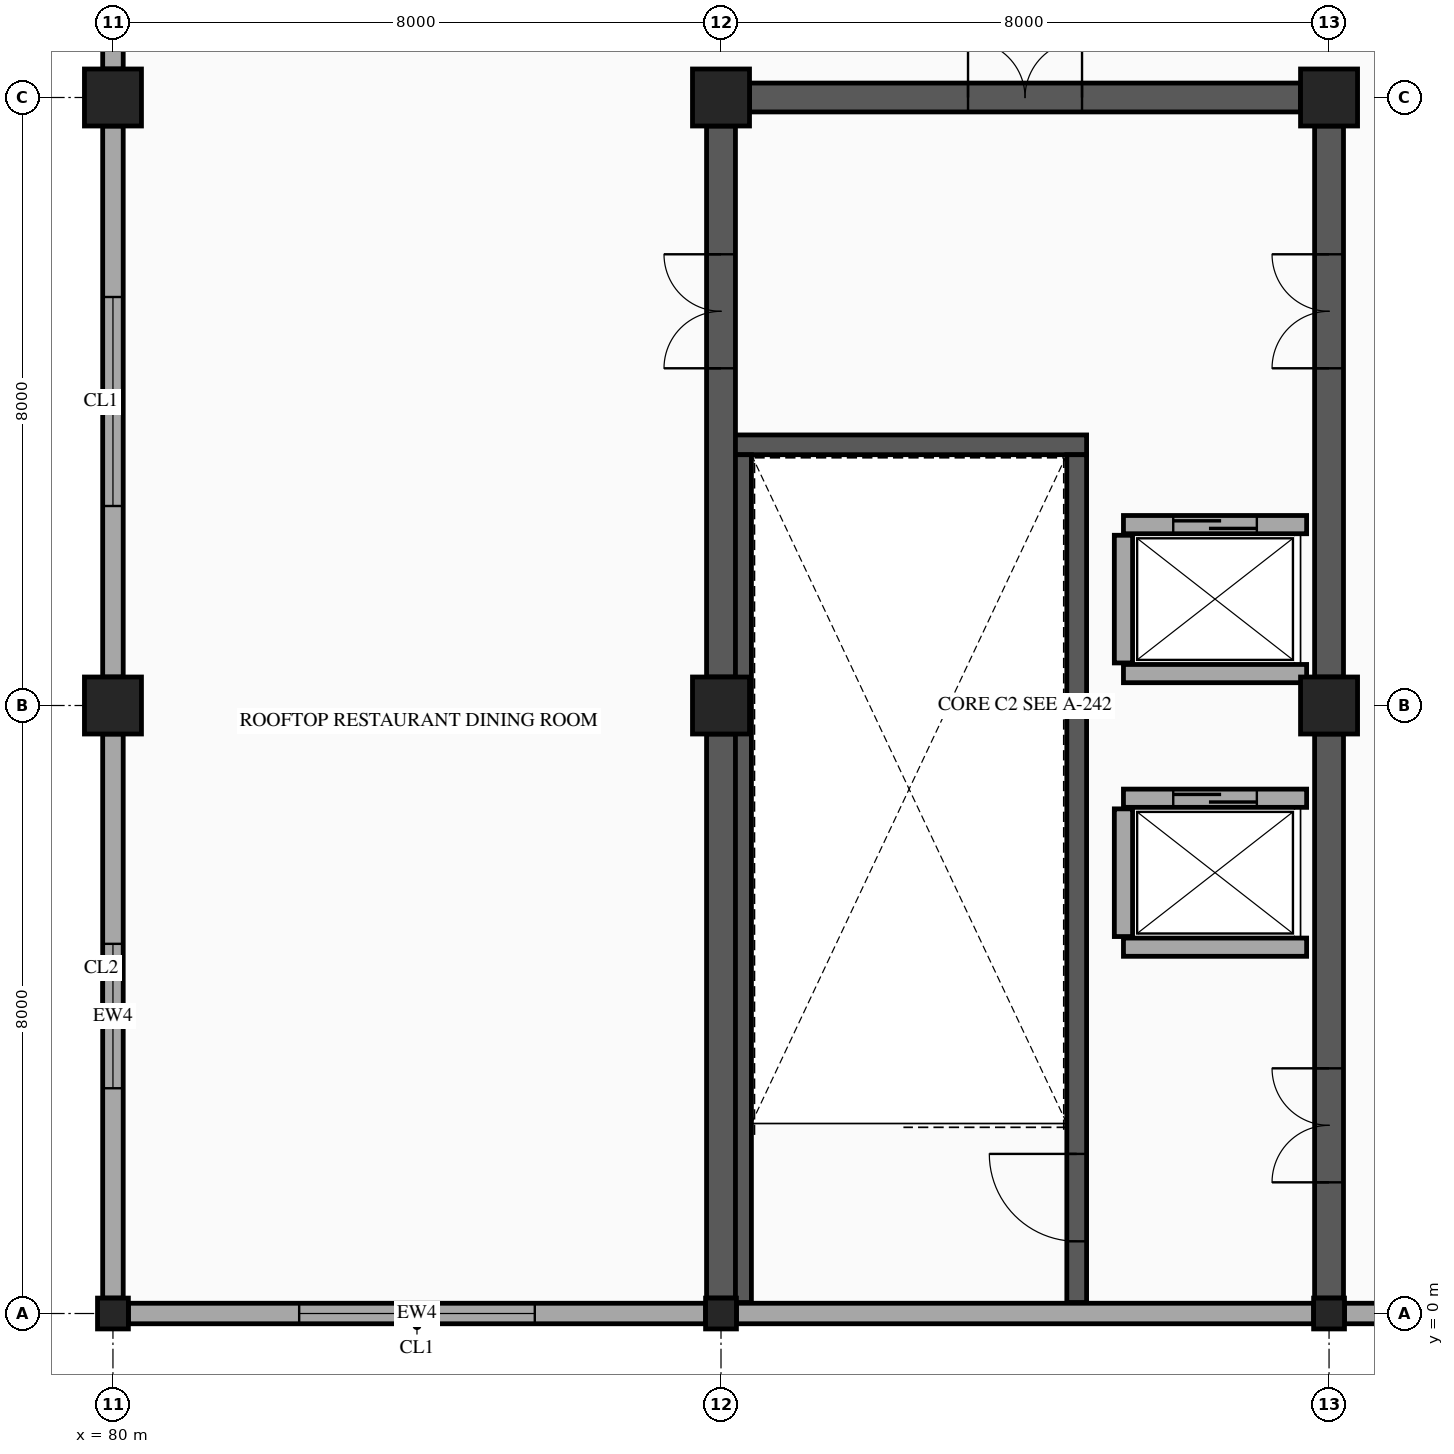
"""IFC4 building model, lengths in metres.
Left out: names, types, materials, properties, quantities, classifications, styles, units other than length and angle.
Written with IfcOpenShell. Run it as: python <this file> out.ifc"""

import sys

from ifc_helpers import new_model, si_unit, direction, frame, frame_2d, origin, origin_2d, place, context, subcontext, project, spatial, rectangle, hollow_rectangle, extrude, element, fill, save


model = new_model("IFC4")
c1 = context("Model", 3, precision=1e-05, world=origin(), true_north=direction((0.0, 1.0)))
c2 = subcontext(c1, "Body", "Model", "MODEL_VIEW")
j1 = project(units=[si_unit("LENGTHUNIT", "METRE"), si_unit("PLANEANGLEUNIT", "RADIAN")], contexts=[c1])
p1 = place(None, origin())
s1 = spatial("IfcSite", under=j1, at=p1, CompositionType="ELEMENT")
p2 = place(p1, origin())
s2 = spatial("IfcBuilding", under=s1, at=p2, CompositionType="ELEMENT")
p3 = place(p2, frame((0.0, 0.0, 28.4)))
s3 = spatial("IfcBuildingStorey", under=s2, at=p3, CompositionType="ELEMENT", Elevation=28.4)
p4 = place(p3, frame((80.0, 0.0, 0.0), z_axis=(0.0, 0.0, 1.0), x_axis=(1.0, 0.0, 0.0)))
e1 = element("IfcColumn", 1, at=p4, inside=s3, PredefinedType="COLUMN", context=c2, shape_type="SweptSolid", body=[
    extrude(hollow_rectangle(XDim=0.406, YDim=0.406, WallThickness=0.015, InnerFilletRadius=0.015, OuterFilletRadius=0.029, at=origin_2d()), origin(), (0.0, 0.0, 1.0), 4.5),
])
for number, where, z_axis, x_axis in (
    (2, (80.0, 8.0, 0.0), (0.0, 0.0, 1.0), (1.0, 0.0, 0.0)),
    (3, (80.0, 16.0, 0.0), (0.0, 0.0, 1.0), (1.0, 0.0, 0.0)),
):
    element("IfcColumn", number, at=place(p3, frame(where, z_axis=z_axis, x_axis=x_axis)), inside=s3, PredefinedType="COLUMN", context=c2, shape_type="SweptSolid", body=[
        extrude(rectangle(XDim=0.75, YDim=0.75, at=origin_2d()), origin(), (0.0, 0.0, 1.0), 4.5),
    ])
p5 = place(p3, frame((88.0, 0.0, 0.0), z_axis=(0.0, 0.0, 1.0), x_axis=(1.0, 0.0, 0.0)))
e4 = element("IfcColumn", 4, at=p5, inside=s3, PredefinedType="COLUMN", context=c2, shape_type="SweptSolid", body=[
    extrude(hollow_rectangle(XDim=0.406, YDim=0.406, WallThickness=0.015, InnerFilletRadius=0.015, OuterFilletRadius=0.029, at=origin_2d()), origin(), (0.0, 0.0, 1.0), 4.5),
])
for number, where, z_axis, x_axis in (
    (5, (88.0, 8.0, 0.0), (0.0, 0.0, 1.0), (1.0, 0.0, 0.0)),
    (6, (88.0, 16.0, 0.0), (0.0, 0.0, 1.0), (1.0, 0.0, 0.0)),
):
    element("IfcColumn", number, at=place(p3, frame(where, z_axis=z_axis, x_axis=x_axis)), inside=s3, PredefinedType="COLUMN", context=c2, shape_type="SweptSolid", body=[
        extrude(rectangle(XDim=0.75, YDim=0.75, at=origin_2d()), origin(), (0.0, 0.0, 1.0), 4.5),
    ])
p6 = place(p3, frame((96.0, 0.0, 0.0), z_axis=(0.0, 0.0, 1.0), x_axis=(1.0, 0.0, 0.0)))
e7 = element("IfcColumn", 7, at=p6, inside=s3, PredefinedType="COLUMN", context=c2, shape_type="SweptSolid", body=[
    extrude(hollow_rectangle(XDim=0.406, YDim=0.406, WallThickness=0.015, InnerFilletRadius=0.015, OuterFilletRadius=0.029, at=origin_2d()), origin(), (0.0, 0.0, 1.0), 4.5),
])
for number, where, z_axis, x_axis in (
    (8, (96.0, 8.0, 0.0), (0.0, 0.0, 1.0), (1.0, 0.0, 0.0)),
    (9, (96.0, 16.0, 0.0), (0.0, 0.0, 1.0), (1.0, 0.0, 0.0)),
):
    element("IfcColumn", number, at=place(p3, frame(where, z_axis=z_axis, x_axis=x_axis)), inside=s3, PredefinedType="COLUMN", context=c2, shape_type="SweptSolid", body=[
        extrude(rectangle(XDim=0.75, YDim=0.75, at=origin_2d()), origin(), (0.0, 0.0, 1.0), 4.5),
    ])
p7 = place(p3, frame((103.797, 0.0, 0.0), z_axis=(0.0, 0.0, 1.0), x_axis=(-1.0, 0.0, 0.0)))
e10 = element("IfcWall", 10, at=p7, inside=s3, PredefinedType="STANDARD", context=c2, shape_type="SweptSolid", body=[
    extrude(rectangle(XDim=7.594, YDim=0.27, at=frame_2d((3.797, 0.0))), origin(), (0.0, 0.0, 1.0), 3.48),
])
p8 = place(p7, frame((2.297, 0.0, 0.8)))
e11 = element("IfcOpeningElement", 11, at=p8, cuts=e10, PredefinedType="OPENING", context=c2, shape_type="SweptSolid", body=[
    extrude(rectangle(XDim=3.0, YDim=1.6, at=frame_2d((1.5, 0.8))), frame((0.0, 0.145, 0.0), z_axis=(0.0, -1.0, 0.0), x_axis=(1.0, 0.0, 0.0)), (0.0, 0.0, 1.0), 0.29),
])
p9 = place(p3, frame((95.797, 0.0, 0.0), z_axis=(0.0, 0.0, 1.0), x_axis=(-1.0, 0.0, 0.0)))
e12 = element("IfcWall", 12, at=p9, inside=s3, PredefinedType="STANDARD", context=c2, shape_type="SweptSolid", body=[
    extrude(rectangle(XDim=7.594, YDim=0.27, at=frame_2d((3.797, 0.0))), origin(), (0.0, 0.0, 1.0), 3.48),
])
p10 = place(p3, frame((87.797, 0.0, 0.0), z_axis=(0.0, 0.0, 1.0), x_axis=(-1.0, 0.0, 0.0)))
e13 = element("IfcWall", 13, at=p10, inside=s3, PredefinedType="STANDARD", context=c2, shape_type="SweptSolid", body=[
    extrude(rectangle(XDim=7.594, YDim=0.27, at=frame_2d((3.797, 0.0))), origin(), (0.0, 0.0, 1.0), 3.48),
])
p11 = place(p10, frame((2.247, 0.0, 0.8)))
e14 = element("IfcOpeningElement", 14, at=p11, cuts=e13, PredefinedType="OPENING", context=c2, shape_type="SweptSolid", body=[
    extrude(rectangle(XDim=3.1, YDim=1.35, at=frame_2d((1.55, 0.675))), frame((0.0, 0.145, 0.0), z_axis=(0.0, -1.0, 0.0), x_axis=(1.0, 0.0, 0.0)), (0.0, 0.0, 1.0), 0.29),
])
p12 = place(p3, frame((80.0, 0.203, 0.0), z_axis=(0.0, 0.0, 1.0), x_axis=(0.0, 1.0, 0.0)))
e15 = element("IfcWall", 15, at=p12, inside=s3, PredefinedType="STANDARD", context=c2, shape_type="SweptSolid", body=[
    extrude(rectangle(XDim=7.422, YDim=0.27, at=frame_2d((3.711, 0.0))), origin(), (0.0, 0.0, 1.0), 3.48),
])
p13 = place(p12, frame((2.761, 0.0, 0.8)))
e16 = element("IfcOpeningElement", 16, at=p13, cuts=e15, PredefinedType="OPENING", context=c2, shape_type="SweptSolid", body=[
    extrude(rectangle(XDim=1.9, YDim=1.65, at=frame_2d((0.95, 0.825))), frame((0.0, 0.145, 0.0), z_axis=(0.0, -1.0, 0.0), x_axis=(1.0, 0.0, 0.0)), (0.0, 0.0, 1.0), 0.29),
])
p14 = place(p3, frame((80.0, 8.375, 0.0), z_axis=(0.0, 0.0, 1.0), x_axis=(0.0, 1.0, 0.0)))
e17 = element("IfcWall", 17, at=p14, inside=s3, PredefinedType="STANDARD", context=c2, shape_type="SweptSolid", body=[
    extrude(rectangle(XDim=7.25, YDim=0.27, at=frame_2d((3.625, 0.0))), origin(), (0.0, 0.0, 1.0), 3.48),
])
p15 = place(p14, frame((2.25, 0.0, 0.8)))
e18 = element("IfcOpeningElement", 18, at=p15, cuts=e17, PredefinedType="OPENING", context=c2, shape_type="SweptSolid", body=[
    extrude(rectangle(XDim=2.75, YDim=2.15, at=frame_2d((1.375, 1.075))), frame((0.0, 0.145, 0.0), z_axis=(0.0, -1.0, 0.0), x_axis=(1.0, 0.0, 0.0)), (0.0, 0.0, 1.0), 0.29),
])
p16 = place(p3, frame((80.0, 16.375, 0.0), z_axis=(0.0, 0.0, 1.0), x_axis=(0.0, 1.0, 0.0)))
e19 = element("IfcWall", 19, at=p16, inside=s3, PredefinedType="STANDARD", context=c2, shape_type="SweptSolid", body=[
    extrude(rectangle(XDim=2.825, YDim=0.27, at=frame_2d((1.413, 0.0))), origin(), (0.0, 0.0, 1.0), 3.48),
])
p17 = place(p3, frame((88.14, 11.43, 0.0), z_axis=(0.0, 0.0, 1.0), x_axis=(1.0, 0.0, 0.0)))
e20 = element("IfcWall", 20, at=p17, inside=s3, PredefinedType="SHEAR", context=c2, shape_type="SweptSolid", body=[
    extrude(rectangle(XDim=4.67, YDim=0.26, at=frame_2d((2.335, 0.0))), origin(), (0.0, 0.0, 1.0), 4.28),
])
p18 = place(p3, frame((88.27, 0.145, 0.0), z_axis=(0.0, 0.0, 1.0), x_axis=(0.0, 1.0, 0.0)))
e21 = element("IfcWall", 21, at=p18, inside=s3, PredefinedType="SHEAR", context=c2, shape_type="SweptSolid", body=[
    extrude(rectangle(XDim=11.155, YDim=0.26, at=frame_2d((5.578, 0.0))), origin(), (0.0, 0.0, 1.0), 4.28),
])
p19 = place(p3, frame((92.68, 0.145, 0.0), z_axis=(0.0, 0.0, 1.0), x_axis=(0.0, 1.0, 0.0)))
e22 = element("IfcWall", 22, at=p19, inside=s3, PredefinedType="SHEAR", context=c2, shape_type="SweptSolid", body=[
    extrude(rectangle(XDim=11.155, YDim=0.26, at=frame_2d((5.578, 0.0))), origin(), (0.0, 0.0, 1.0), 4.28),
])
p20 = place(p19, frame((0.805, 0.0, 0.0)))
e23 = element("IfcOpeningElement", 23, at=p20, cuts=e22, PredefinedType="OPENING", context=c2, shape_type="SweptSolid", body=[
    extrude(rectangle(XDim=1.15, YDim=2.15, at=frame_2d((0.575, 1.075))), frame((0.0, 0.14, 0.0), z_axis=(0.0, -1.0, 0.0), x_axis=(1.0, 0.0, 0.0)), (0.0, 0.0, 1.0), 0.28),
])
p21 = place(p3, frame((88.375, 16.0, 0.0), z_axis=(0.0, 0.0, 1.0), x_axis=(1.0, 0.0, 0.0)))
e24 = element("IfcWall", 24, at=p21, inside=s3, PredefinedType="SHEAR", context=c2, shape_type="SweptSolid", body=[
    extrude(rectangle(XDim=7.25, YDim=0.38, at=frame_2d((3.625, 0.0))), origin(), (0.0, 0.0, 1.0), 4.28),
])
p22 = place(p21, frame((2.875, 0.0, 0.0)))
e25 = element("IfcOpeningElement", 25, at=p22, cuts=e24, PredefinedType="OPENING", context=c2, shape_type="SweptSolid", body=[
    extrude(rectangle(XDim=1.5, YDim=2.15, at=frame_2d((0.75, 1.075))), frame((0.0, 0.2, 0.0), z_axis=(0.0, -1.0, 0.0), x_axis=(1.0, 0.0, 0.0)), (0.0, 0.0, 1.0), 0.4),
])
p23 = place(p3, frame((88.0, 0.203, 0.0), z_axis=(0.0, 0.0, 1.0), x_axis=(0.0, 1.0, 0.0)))
e26 = element("IfcWall", 26, at=p23, inside=s3, PredefinedType="SHEAR", context=c2, shape_type="SweptSolid", body=[
    extrude(rectangle(XDim=7.422, YDim=0.38, at=frame_2d((3.711, 0.0))), origin(), (0.0, 0.0, 1.0), 4.28),
])
p24 = place(p3, frame((88.0, 8.375, 0.0), z_axis=(0.0, 0.0, 1.0), x_axis=(0.0, 1.0, 0.0)))
e27 = element("IfcWall", 27, at=p24, inside=s3, PredefinedType="SHEAR", context=c2, shape_type="SweptSolid", body=[
    extrude(rectangle(XDim=7.25, YDim=0.38, at=frame_2d((3.625, 0.0))), origin(), (0.0, 0.0, 1.0), 4.28),
])
p25 = place(p24, frame((4.062, 0.0, 0.0)))
e28 = element("IfcOpeningElement", 28, at=p25, cuts=e27, PredefinedType="OPENING", context=c2, shape_type="SweptSolid", body=[
    extrude(rectangle(XDim=1.5, YDim=2.15, at=frame_2d((0.75, 1.075))), frame((0.0, 0.2, 0.0), z_axis=(0.0, -1.0, 0.0), x_axis=(1.0, 0.0, 0.0)), (0.0, 0.0, 1.0), 0.4),
])
p26 = place(p3, frame((96.0, 0.203, 0.0), z_axis=(0.0, 0.0, 1.0), x_axis=(0.0, 1.0, 0.0)))
e29 = element("IfcWall", 29, at=p26, inside=s3, PredefinedType="SHEAR", context=c2, shape_type="SweptSolid", body=[
    extrude(rectangle(XDim=7.422, YDim=0.38, at=frame_2d((3.711, 0.0))), origin(), (0.0, 0.0, 1.0), 4.28),
])
p27 = place(p26, frame((1.523, 0.0, 0.0)))
e30 = element("IfcOpeningElement", 30, at=p27, cuts=e29, PredefinedType="OPENING", context=c2, shape_type="SweptSolid", body=[
    extrude(rectangle(XDim=1.5, YDim=2.15, at=frame_2d((0.75, 1.075))), frame((0.0, 0.2, 0.0), z_axis=(0.0, -1.0, 0.0), x_axis=(1.0, 0.0, 0.0)), (0.0, 0.0, 1.0), 0.4),
])
p28 = place(p3, frame((96.0, 8.375, 0.0), z_axis=(0.0, 0.0, 1.0), x_axis=(0.0, 1.0, 0.0)))
e31 = element("IfcWall", 31, at=p28, inside=s3, PredefinedType="SHEAR", context=c2, shape_type="SweptSolid", body=[
    extrude(rectangle(XDim=7.25, YDim=0.38, at=frame_2d((3.625, 0.0))), origin(), (0.0, 0.0, 1.0), 4.28),
])
p29 = place(p28, frame((4.062, 0.0, 0.0)))
e32 = element("IfcOpeningElement", 32, at=p29, cuts=e31, PredefinedType="OPENING", context=c2, shape_type="SweptSolid", body=[
    extrude(rectangle(XDim=1.5, YDim=2.15, at=frame_2d((0.75, 1.075))), frame((0.0, 0.2, 0.0), z_axis=(0.0, -1.0, 0.0), x_axis=(1.0, 0.0, 0.0)), (0.0, 0.0, 1.0), 0.4),
])
p30 = place(p3, frame((93.295, 6.78, 0.0), z_axis=(0.0, 0.0, 1.0), x_axis=(1.0, 0.0, 0.0)))
e33 = element("IfcWall", 33, at=p30, inside=s3, PredefinedType="PARTITIONING", context=c2, shape_type="SweptSolid", body=[
    extrude(rectangle(XDim=2.41, YDim=0.24, at=frame_2d((1.205, 0.0))), origin(), (0.0, 0.0, 1.0), 4.28),
])
p31 = place(p30, frame((0.655, 0.0, 0.0)))
e34 = element("IfcOpeningElement", 34, at=p31, cuts=e33, PredefinedType="OPENING", context=c2, shape_type="SweptSolid", body=[
    extrude(rectangle(XDim=1.1, YDim=2.15, at=frame_2d((0.55, 1.075))), frame((0.0, 0.13, 0.0), z_axis=(0.0, -1.0, 0.0), x_axis=(1.0, 0.0, 0.0)), (0.0, 0.0, 1.0), 0.26),
])
p32 = place(p3, frame((93.295, 4.82, 0.0), z_axis=(0.0, 0.0, 1.0), x_axis=(1.0, 0.0, 0.0)))
e35 = element("IfcWall", 35, at=p32, inside=s3, PredefinedType="PARTITIONING", context=c2, shape_type="SweptSolid", body=[
    extrude(rectangle(XDim=2.41, YDim=0.24, at=frame_2d((1.205, 0.0))), origin(), (0.0, 0.0, 1.0), 4.28),
])
p33 = place(p3, frame((93.295, 4.96, 0.0), z_axis=(0.0, 0.0, 1.0), x_axis=(0.0, 1.0, 0.0)))
e36 = element("IfcWall", 36, at=p33, inside=s3, PredefinedType="PARTITIONING", context=c2, shape_type="SweptSolid", body=[
    extrude(rectangle(XDim=1.68, YDim=0.24, at=frame_2d((0.84, 0.0))), origin(), (0.0, 0.0, 1.0), 4.28),
])
p34 = place(p3, frame((93.295, 10.38, 0.0), z_axis=(0.0, 0.0, 1.0), x_axis=(1.0, 0.0, 0.0)))
e37 = element("IfcWall", 37, at=p34, inside=s3, PredefinedType="PARTITIONING", context=c2, shape_type="SweptSolid", body=[
    extrude(rectangle(XDim=2.41, YDim=0.24, at=frame_2d((1.205, 0.0))), origin(), (0.0, 0.0, 1.0), 4.28),
])
p35 = place(p34, frame((0.655, 0.0, 0.0)))
e38 = element("IfcOpeningElement", 38, at=p35, cuts=e37, PredefinedType="OPENING", context=c2, shape_type="SweptSolid", body=[
    extrude(rectangle(XDim=1.1, YDim=2.15, at=frame_2d((0.55, 1.075))), frame((0.0, 0.13, 0.0), z_axis=(0.0, -1.0, 0.0), x_axis=(1.0, 0.0, 0.0)), (0.0, 0.0, 1.0), 0.26),
])
p36 = place(p3, frame((93.295, 8.42, 0.0), z_axis=(0.0, 0.0, 1.0), x_axis=(1.0, 0.0, 0.0)))
e39 = element("IfcWall", 39, at=p36, inside=s3, PredefinedType="PARTITIONING", context=c2, shape_type="SweptSolid", body=[
    extrude(rectangle(XDim=2.41, YDim=0.24, at=frame_2d((1.205, 0.0))), origin(), (0.0, 0.0, 1.0), 4.28),
])
p37 = place(p3, frame((93.295, 8.56, 0.0), z_axis=(0.0, 0.0, 1.0), x_axis=(0.0, 1.0, 0.0)))
e40 = element("IfcWall", 40, at=p37, inside=s3, PredefinedType="PARTITIONING", context=c2, shape_type="SweptSolid", body=[
    extrude(rectangle(XDim=1.68, YDim=0.24, at=frame_2d((0.84, 0.0))), origin(), (0.0, 0.0, 1.0), 4.28),
])
p38 = place(p11, origin())
e41 = element("IfcWindow", 41, at=p38, inside=s3, PartitioningType="TRIPLE_PANEL_VERTICAL", PredefinedType="WINDOW", context=c2, shape_type="SweptSolid", body=[
    extrude(rectangle(XDim=3.1, YDim=1.35, at=frame_2d((1.55, 0.675))), frame((0.0, 0.03, 0.0), z_axis=(0.0, -1.0, 0.0), x_axis=(1.0, 0.0, 0.0)), (0.0, 0.0, 1.0), 0.06),
])
fill(e14, e41)
p39 = place(p13, origin())
e42 = element("IfcWindow", 42, at=p39, inside=s3, PartitioningType="DOUBLE_PANEL_VERTICAL", PredefinedType="WINDOW", context=c2, shape_type="SweptSolid", body=[
    extrude(rectangle(XDim=1.9, YDim=1.65, at=frame_2d((0.95, 0.825))), frame((0.0, 0.03, 0.0), z_axis=(0.0, -1.0, 0.0), x_axis=(1.0, 0.0, 0.0)), (0.0, 0.0, 1.0), 0.06),
])
fill(e16, e42)
p40 = place(p15, origin())
e43 = element("IfcWindow", 43, at=p40, inside=s3, PartitioningType="TRIPLE_PANEL_VERTICAL", PredefinedType="WINDOW", context=c2, shape_type="SweptSolid", body=[
    extrude(rectangle(XDim=2.75, YDim=2.15, at=frame_2d((1.375, 1.075))), frame((0.0, 0.03, 0.0), z_axis=(0.0, -1.0, 0.0), x_axis=(1.0, 0.0, 0.0)), (0.0, 0.0, 1.0), 0.06),
])
fill(e18, e43)
p41 = place(p20, origin())
e44 = element("IfcDoor", 44, at=p41, inside=s3, OperationType="SINGLE_SWING_RIGHT", PredefinedType="DOOR", context=c2, shape_type="SweptSolid", body=[
    extrude(rectangle(XDim=1.15, YDim=2.15, at=frame_2d((0.575, 1.075))), frame((0.0, 0.025, 0.0), z_axis=(0.0, -1.0, 0.0), x_axis=(1.0, 0.0, 0.0)), (0.0, 0.0, 1.0), 0.05),
])
fill(e23, e44)
p42 = place(p22, origin())
e45 = element("IfcDoor", 45, at=p42, inside=s3, OperationType="DOUBLE_DOOR_SINGLE_SWING", PredefinedType="DOOR", context=c2, shape_type="SweptSolid", body=[
    extrude(rectangle(XDim=1.5, YDim=2.15, at=frame_2d((0.75, 1.075))), frame((0.0, 0.025, 0.0), z_axis=(0.0, -1.0, 0.0), x_axis=(1.0, 0.0, 0.0)), (0.0, 0.0, 1.0), 0.05),
])
fill(e25, e45)
p43 = place(p25, origin())
e46 = element("IfcDoor", 46, at=p43, inside=s3, OperationType="DOUBLE_DOOR_SINGLE_SWING", PredefinedType="DOOR", context=c2, shape_type="SweptSolid", body=[
    extrude(rectangle(XDim=1.5, YDim=2.15, at=frame_2d((0.75, 1.075))), frame((0.0, 0.025, 0.0), z_axis=(0.0, -1.0, 0.0), x_axis=(1.0, 0.0, 0.0)), (0.0, 0.0, 1.0), 0.05),
])
fill(e28, e46)
p44 = place(p27, origin())
e47 = element("IfcDoor", 47, at=p44, inside=s3, OperationType="DOUBLE_DOOR_SINGLE_SWING", PredefinedType="DOOR", context=c2, shape_type="SweptSolid", body=[
    extrude(rectangle(XDim=1.5, YDim=2.15, at=frame_2d((0.75, 1.075))), frame((0.0, 0.025, 0.0), z_axis=(0.0, -1.0, 0.0), x_axis=(1.0, 0.0, 0.0)), (0.0, 0.0, 1.0), 0.05),
])
fill(e30, e47)
p45 = place(p29, origin())
e48 = element("IfcDoor", 48, at=p45, inside=s3, OperationType="DOUBLE_DOOR_SINGLE_SWING", PredefinedType="DOOR", context=c2, shape_type="SweptSolid", body=[
    extrude(rectangle(XDim=1.5, YDim=2.15, at=frame_2d((0.75, 1.075))), frame((0.0, 0.025, 0.0), z_axis=(0.0, -1.0, 0.0), x_axis=(1.0, 0.0, 0.0)), (0.0, 0.0, 1.0), 0.05),
])
fill(e32, e48)
p46 = place(p31, origin())
e49 = element("IfcDoor", 49, at=p46, inside=s3, OperationType="SLIDING_TO_LEFT", PredefinedType="DOOR", context=c2, shape_type="SweptSolid", body=[
    extrude(rectangle(XDim=1.1, YDim=2.15, at=frame_2d((0.55, 1.075))), frame((0.0, 0.025, 0.0), z_axis=(0.0, -1.0, 0.0), x_axis=(1.0, 0.0, 0.0)), (0.0, 0.0, 1.0), 0.05),
])
fill(e34, e49)
p47 = place(p35, origin())
e50 = element("IfcDoor", 50, at=p47, inside=s3, OperationType="SLIDING_TO_LEFT", PredefinedType="DOOR", context=c2, shape_type="SweptSolid", body=[
    extrude(rectangle(XDim=1.1, YDim=2.15, at=frame_2d((0.55, 1.075))), frame((0.0, 0.025, 0.0), z_axis=(0.0, -1.0, 0.0), x_axis=(1.0, 0.0, 0.0)), (0.0, 0.0, 1.0), 0.05),
])
fill(e38, e50)
save(model, sys.argv[1])
